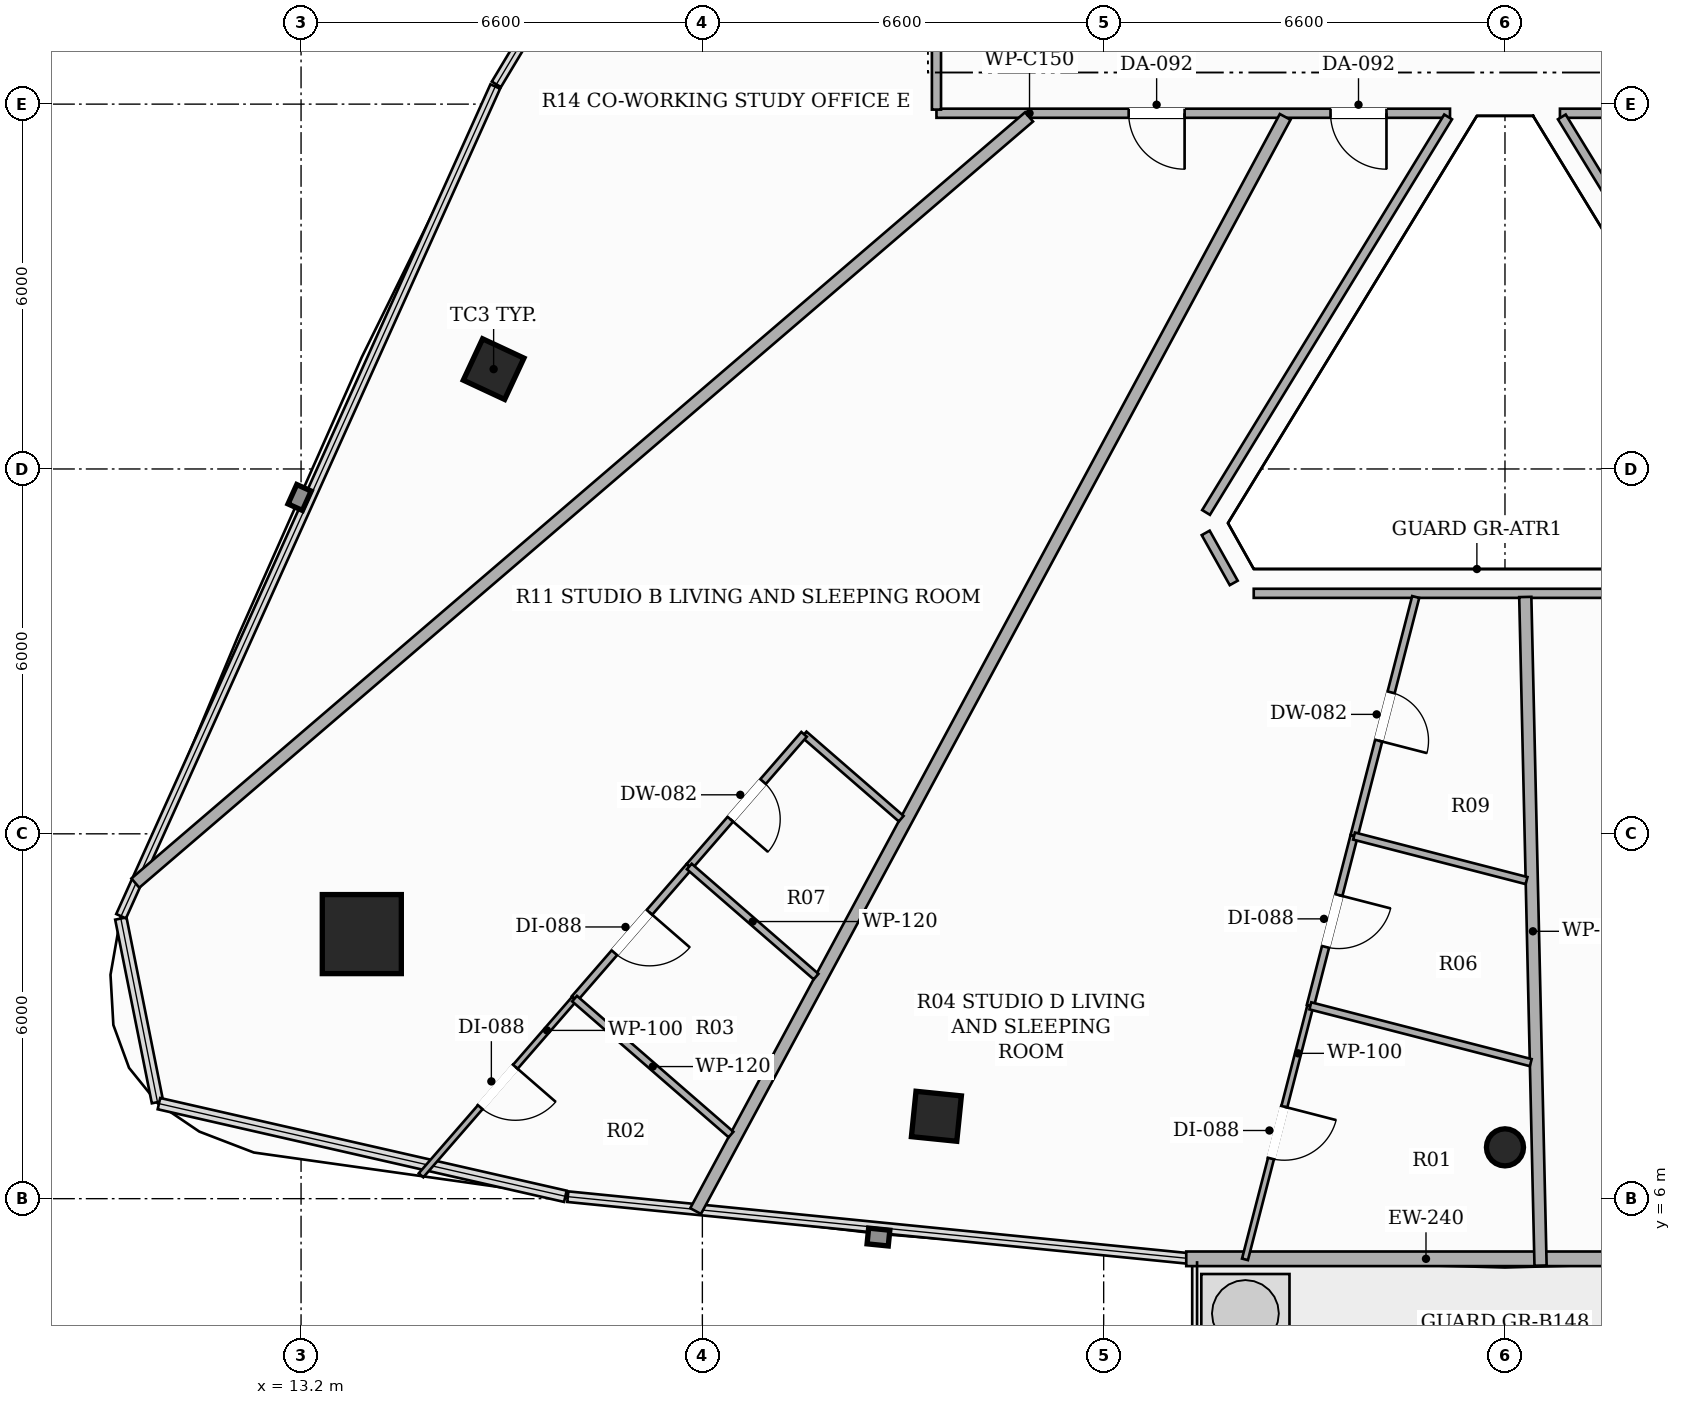
"""IFC4 building model, lengths in metres.
Left out: names, types, materials, properties, quantities, classifications, styles, units other than length and angle.
Written with IfcOpenShell. Run it as: python <this file> out.ifc"""

import sys

from ifc_helpers import new_model, si_unit, direction, frame, frame_2d, origin, origin_2d, place, context, subcontext, project, spatial, rectangle, hollow_rectangle, hollow_circle, extrude, element, fill, save


model = new_model("IFC4")
c1 = context("Model", 3, precision=1e-05, world=origin(), true_north=direction((0.0, 1.0)))
c2 = subcontext(c1, "Body", "Model", "MODEL_VIEW")
j1 = project(units=[si_unit("LENGTHUNIT", "METRE"), si_unit("PLANEANGLEUNIT", "RADIAN")], contexts=[c1])
p1 = place(None, origin())
s1 = spatial("IfcSite", under=j1, at=p1, CompositionType="ELEMENT")
p2 = place(p1, origin())
s2 = spatial("IfcBuilding", under=s1, at=p2, CompositionType="ELEMENT")
p3 = place(p2, frame((0.0, 0.0, 229.4)))
s3 = spatial("IfcBuildingStorey", under=s2, at=p3, CompositionType="ELEMENT", Elevation=229.4)
p4 = place(p3, frame((14.199, 10.351, 0.0), z_axis=(0.0, 0.0, 1.0), x_axis=(1.0, 0.0, 0.0)))
e1 = element("IfcColumn", 1, at=p4, inside=s3, PredefinedType="COLUMN", context=c2, shape_type="SweptSolid", body=[
    extrude(hollow_rectangle(XDim=1.3, YDim=1.3, WallThickness=0.04, at=origin_2d()), origin(), (0.0, 0.0, 1.0), 3.3),
])
for number, where, z_axis, x_axis in (
    (2, (16.367, 19.642, 0.0), (0.0, 0.0, 1.0), (0.423, 0.906, 0.0)),
    (3, (23.649, 7.355, 0.0), (0.0, 0.0, 1.0), (-0.995, 0.101, 0.0)),
):
    element("IfcColumn", number, at=place(p3, frame(where, z_axis=z_axis, x_axis=x_axis)), inside=s3, PredefinedType="COLUMN", context=c2, shape_type="SweptSolid", body=[
        extrude(hollow_rectangle(XDim=0.75, YDim=0.75, WallThickness=0.025, at=origin_2d()), origin(), (0.0, 0.0, 1.0), 3.3),
    ])
p5 = place(p3, frame((33.0, 6.844, 0.0), z_axis=(0.0, 0.0, 1.0), x_axis=(1.0, 0.0, 0.0)))
e4 = element("IfcColumn", 4, at=p5, inside=s3, PredefinedType="COLUMN", context=c2, shape_type="SweptSolid", body=[
    extrude(hollow_circle(Radius=0.305, WallThickness=0.016, at=origin_2d()), origin(), (0.0, 0.0, 1.0), 3.3),
])
p6 = place(p3, frame((27.758, 5.011, 0.0), z_axis=(0.0, 0.0, 1.0), x_axis=(1.0, 0.0, 0.0)))
e5 = element("IfcWall", 5, at=p6, inside=s3, PredefinedType="SOLIDWALL", context=c2, shape_type="SweptSolid", body=[
    extrude(rectangle(XDim=10.484, YDim=0.24, at=frame_2d((5.242, 0.0))), origin(), (0.0, 0.0, 1.0), 2.624),
])
p7 = place(p6, frame((7.986, 0.0, 0.0)))
e6 = element("IfcOpeningElement", 6, at=p7, cuts=e5, PredefinedType="OPENING", context=c2, shape_type="SweptSolid", body=[
    extrude(rectangle(XDim=1.8, YDim=2.2, at=frame_2d((0.9, 1.1))), frame((0.0, 0.13, 0.0), z_axis=(0.0, -1.0, 0.0), x_axis=(1.0, 0.0, 0.0)), (0.0, 0.0, 1.0), 0.26),
])
p8 = place(p3, frame((32.096, 23.85, 0.0), z_axis=(0.0, 0.0, 1.0), x_axis=(-1.0, 0.0, 0.0)))
e7 = element("IfcWall", 7, at=p8, inside=s3, PredefinedType="PARTITIONING", context=c2, shape_type="SweptSolid", body=[
    extrude(rectangle(XDim=8.446, YDim=0.15, at=frame_2d((4.223, 0.0))), origin(), (0.0, 0.0, 1.0), 2.565),
])
p9 = place(p8, frame((4.365, 0.0, 0.0)))
e8 = element("IfcOpeningElement", 8, at=p9, cuts=e7, PredefinedType="OPENING", context=c2, shape_type="SweptSolid", body=[
    extrude(rectangle(XDim=0.92, YDim=2.15, at=frame_2d((0.46, 1.075))), frame((0.0, 0.085, 0.0), z_axis=(0.0, -1.0, 0.0), x_axis=(1.0, 0.0, 0.0)), (0.0, 0.0, 1.0), 0.17),
])
p10 = place(p8, frame((1.045, 0.0, 0.0)))
e9 = element("IfcOpeningElement", 9, at=p10, cuts=e7, PredefinedType="OPENING", context=c2, shape_type="SweptSolid", body=[
    extrude(rectangle(XDim=0.92, YDim=2.15, at=frame_2d((0.46, 1.075))), frame((0.0, 0.085, 0.0), z_axis=(0.0, -1.0, 0.0), x_axis=(1.0, 0.0, 0.0)), (0.0, 0.0, 1.0), 0.17),
])
p11 = place(p3, frame((23.65, 23.91, 0.0), z_axis=(0.0, 0.0, 1.0), x_axis=(0.0, 1.0, 0.0)))
e10 = element("IfcWall", 10, at=p11, inside=s3, PredefinedType="PARTITIONING", context=c2, shape_type="SweptSolid", body=[
    extrude(rectangle(XDim=11.888, YDim=0.15, at=frame_2d((5.944, 0.0))), origin(), (0.0, 0.0, 1.0), 2.492),
])
p12 = place(p11, frame((5.504, 0.0, 0.0)))
e11 = element("IfcOpeningElement", 11, at=p12, cuts=e10, PredefinedType="OPENING", context=c2, shape_type="SweptSolid", body=[
    extrude(rectangle(XDim=0.88, YDim=2.1, at=frame_2d((0.44, 1.05))), frame((0.0, 0.085, 0.0), z_axis=(0.0, -1.0, 0.0), x_axis=(1.0, 0.0, 0.0)), (0.0, 0.0, 1.0), 0.17),
])
p13 = place(p3, frame((42.19, 23.85, 0.0), z_axis=(0.0, 0.0, 1.0), x_axis=(-1.0, 0.0, 0.0)))
e12 = element("IfcWall", 12, at=p13, inside=s3, PredefinedType="PARTITIONING", context=c2, shape_type="SweptSolid", body=[
    extrude(rectangle(XDim=8.286, YDim=0.15, at=frame_2d((4.143, 0.0))), origin(), (0.0, 0.0, 1.0), 2.565),
])
p14 = place(p13, frame((5.824, 0.0, 0.0)))
e13 = element("IfcOpeningElement", 13, at=p14, cuts=e12, PredefinedType="OPENING", context=c2, shape_type="SweptSolid", body=[
    extrude(rectangle(XDim=0.88, YDim=2.1, at=frame_2d((0.44, 1.05))), frame((0.0, 0.085, 0.0), z_axis=(0.0, -1.0, 0.0), x_axis=(1.0, 0.0, 0.0)), (0.0, 0.0, 1.0), 0.17),
])
p15 = place(p13, frame((2.745, 0.0, 0.0)))
e14 = element("IfcOpeningElement", 14, at=p15, cuts=e12, PredefinedType="OPENING", context=c2, shape_type="SweptSolid", body=[
    extrude(rectangle(XDim=0.88, YDim=2.1, at=frame_2d((0.44, 1.05))), frame((0.0, 0.085, 0.0), z_axis=(0.0, -1.0, 0.0), x_axis=(1.0, 0.0, 0.0)), (0.0, 0.0, 1.0), 0.17),
])
p16 = place(p3, frame((33.935, 23.79, 0.0), z_axis=(0.0, 0.0, 1.0), x_axis=(0.521984684225, -0.852954857794, 0.0)))
e15 = element("IfcWall", 15, at=p16, inside=s3, PredefinedType="PARTITIONING", context=c2, shape_type="SweptSolid", body=[
    extrude(rectangle(XDim=7.626, YDim=0.15, at=frame_2d((3.813, 0.0))), origin(), (0.0, 0.0, 1.0), 2.773),
])
p17 = place(p3, frame((37.132, 15.955, 0.0), z_axis=(0.0, 0.0, 1.0), x_axis=(-1.0, 0.0, 0.0)))
e16 = element("IfcWall", 16, at=p17, inside=s3, PredefinedType="PARTITIONING", context=c2, shape_type="SweptSolid", body=[
    extrude(rectangle(XDim=8.264, YDim=0.15, at=frame_2d((4.132, 0.0))), origin(), (0.0, 0.0, 1.0), 2.773),
])
p18 = place(p3, frame((28.539, 16.126, 0.0), z_axis=(0.0, 0.0, 1.0), x_axis=(-0.488847636641, 0.87236918111, 0.0)))
e17 = element("IfcWall", 17, at=p18, inside=s3, PredefinedType="PARTITIONING", context=c2, shape_type="SweptSolid", body=[
    extrude(rectangle(XDim=0.943, YDim=0.15, at=frame_2d((0.472, 0.0))), origin(), (0.0, 0.0, 1.0), 3.06),
])
p19 = place(p3, frame((28.084, 17.285, 0.0), z_axis=(0.0, 0.0, 1.0), x_axis=(0.521984684225, 0.852954857794, 0.0)))
e18 = element("IfcWall", 18, at=p19, inside=s3, PredefinedType="PARTITIONING", context=c2, shape_type="SweptSolid", body=[
    extrude(rectangle(XDim=7.626, YDim=0.15, at=frame_2d((3.813, 0.0))), origin(), (0.0, 0.0, 1.0), 2.773),
])
p20 = place(p3, frame((33.585, 4.899, 0.0), z_axis=(0.0, 0.0, 1.0), x_axis=(-0.022818213595, 0.999739630668, 0.0)))
e19 = element("IfcWall", 19, at=p20, inside=s3, PredefinedType="PARTITIONING", context=c2, shape_type="SweptSolid", body=[
    extrude(rectangle(XDim=10.999, YDim=0.2, at=frame_2d((5.5, 0.0))), origin(), (0.0, 0.0, 1.0), 2.492),
])
p21 = place(p3, frame((29.385, 23.79, 0.0), z_axis=(0.0, 0.0, 1.0), x_axis=(-0.474361203305, -0.880330306646, 0.0)))
e20 = element("IfcWall", 20, at=p21, inside=s3, PredefinedType="PARTITIONING", context=c2, shape_type="SweptSolid", body=[
    extrude(rectangle(XDim=20.44, YDim=0.2, at=frame_2d((10.22, 0.0))), origin(), (0.0, 0.0, 1.0), 2.492),
])
p22 = place(p3, frame((10.475, 11.19, 0.0), z_axis=(0.0, 0.0, 1.0), x_axis=(0.759210311249, 0.650845375871, 0.0)))
e21 = element("IfcWall", 21, at=p22, inside=s3, PredefinedType="PARTITIONING", context=c2, shape_type="SweptSolid", body=[
    extrude(rectangle(XDim=19.36, YDim=0.2, at=frame_2d((9.68, 0.0))), origin(), (0.0, 0.0, 1.0), 2.492),
])
p23 = place(p3, frame((23.07, 12.249, 0.0), z_axis=(0.0, 0.0, 1.0), x_axis=(-0.75504514731, 0.655672803709, 0.0)))
e22 = element("IfcWall", 22, at=p23, inside=s3, PredefinedType="PARTITIONING", context=c2, shape_type="SweptSolid", body=[
    extrude(rectangle(XDim=2.115, YDim=0.12, at=frame_2d((1.058, 0.0))), origin(), (0.0, 0.0, 1.0), 2.773),
])
p24 = place(p3, frame((21.473, 13.636, 0.0), z_axis=(0.0, 0.0, 1.0), x_axis=(-0.655840593364, -0.754899407932, 0.0)))
e23 = element("IfcWall", 23, at=p24, inside=s3, PredefinedType="PARTITIONING", context=c2, shape_type="SweptSolid", body=[
    extrude(rectangle(XDim=2.879, YDim=0.12, at=frame_2d((1.439, 0.0))), origin(), (0.0, 0.0, 1.0), 2.773),
])
p25 = place(p24, frame((1.029, 0.0, 0.0)))
e24 = element("IfcOpeningElement", 24, at=p25, cuts=e23, PredefinedType="OPENING", context=c2, shape_type="SweptSolid", body=[
    extrude(rectangle(XDim=0.82, YDim=2.1, at=frame_2d((0.41, 1.05))), frame((0.0, 0.07, 0.0), z_axis=(0.0, -1.0, 0.0), x_axis=(1.0, 0.0, 0.0)), (0.0, 0.0, 1.0), 0.14),
])
p26 = place(p3, frame((19.585, 11.463, 0.0), z_axis=(0.0, 0.0, 1.0), x_axis=(-0.655689200825, -0.755030907924, 0.0)))
e25 = element("IfcWall", 25, at=p26, inside=s3, PredefinedType="PARTITIONING", context=c2, shape_type="SweptSolid", body=[
    extrude(rectangle(XDim=2.878, YDim=0.12, at=frame_2d((1.439, 0.0))), origin(), (0.0, 0.0, 1.0), 2.492),
])
p27 = place(p26, frame((0.999, 0.0, 0.0)))
e26 = element("IfcOpeningElement", 26, at=p27, cuts=e25, PredefinedType="OPENING", context=c2, shape_type="SweptSolid", body=[
    extrude(rectangle(XDim=0.88, YDim=2.1, at=frame_2d((0.44, 1.05))), frame((0.0, 0.07, 0.0), z_axis=(0.0, -1.0, 0.0), x_axis=(1.0, 0.0, 0.0)), (0.0, 0.0, 1.0), 0.14),
])
p28 = place(p3, frame((17.698, 9.29, 0.0), z_axis=(0.0, 0.0, 1.0), x_axis=(-0.655874061554, -0.754870330176, 0.0)))
e27 = element("IfcWall", 27, at=p28, inside=s3, PredefinedType="PARTITIONING", context=c2, shape_type="SweptSolid", body=[
    extrude(rectangle(XDim=3.85, YDim=0.1, at=frame_2d((1.925, 0.0))), origin(), (0.0, 0.0, 1.0), 2.492),
])
p29 = place(p28, frame((1.485, 0.0, 0.0)))
e28 = element("IfcOpeningElement", 28, at=p29, cuts=e27, PredefinedType="OPENING", context=c2, shape_type="SweptSolid", body=[
    extrude(rectangle(XDim=0.88, YDim=2.1, at=frame_2d((0.44, 1.05))), frame((0.0, 0.06, 0.0), z_axis=(0.0, -1.0, 0.0), x_axis=(1.0, 0.0, 0.0)), (0.0, 0.0, 1.0), 0.12),
])
p30 = place(p3, frame((21.67, 9.652, 0.0), z_axis=(0.0, 0.0, 1.0), x_axis=(-0.755003171317, 0.655721138367, 0.0)))
e29 = element("IfcWall", 29, at=p30, inside=s3, PredefinedType="PARTITIONING", context=c2, shape_type="SweptSolid", body=[
    extrude(rectangle(XDim=2.761, YDim=0.12, at=frame_2d((1.381, 0.0))), origin(), (0.0, 0.0, 1.0), 2.773),
])
p31 = place(p3, frame((20.271, 7.055, 0.0), z_axis=(0.0, 0.0, 1.0), x_axis=(-0.754936987289, 0.65579733548, 0.0)))
e30 = element("IfcWall", 30, at=p31, inside=s3, PredefinedType="PARTITIONING", context=c2, shape_type="SweptSolid", body=[
    extrude(rectangle(XDim=3.408, YDim=0.12, at=frame_2d((1.704, 0.0))), origin(), (0.0, 0.0, 1.0), 2.492),
])
p32 = place(p3, frame((31.532, 15.895, 0.0), z_axis=(0.0, 0.0, 1.0), x_axis=(-0.24968708983, -0.968326575682, 0.0)))
e31 = element("IfcWall", 31, at=p32, inside=s3, PredefinedType="PARTITIONING", context=c2, shape_type="SweptSolid", body=[
    extrude(rectangle(XDim=4.061, YDim=0.12, at=frame_2d((2.03, 0.0))), origin(), (0.0, 0.0, 1.0), 3.06),
])
p33 = place(p32, frame((1.62, 0.0, 0.0)))
e32 = element("IfcOpeningElement", 32, at=p33, cuts=e31, PredefinedType="OPENING", context=c2, shape_type="SweptSolid", body=[
    extrude(rectangle(XDim=0.82, YDim=2.1, at=frame_2d((0.41, 1.05))), frame((0.0, 0.07, 0.0), z_axis=(0.0, -1.0, 0.0), x_axis=(1.0, 0.0, 0.0)), (0.0, 0.0, 1.0), 0.14),
])
p34 = place(p3, frame((30.518, 11.963, 0.0), z_axis=(0.0, 0.0, 1.0), x_axis=(-0.249383700926, -0.968404755106, 0.0)))
e33 = element("IfcWall", 33, at=p34, inside=s3, PredefinedType="PARTITIONING", context=c2, shape_type="SweptSolid", body=[
    extrude(rectangle(XDim=2.883, YDim=0.12, at=frame_2d((1.441, 0.0))), origin(), (0.0, 0.0, 1.0), 3.06),
])
p35 = place(p34, frame((1.002, 0.0, 0.0)))
e34 = element("IfcOpeningElement", 34, at=p35, cuts=e33, PredefinedType="OPENING", context=c2, shape_type="SweptSolid", body=[
    extrude(rectangle(XDim=0.88, YDim=2.1, at=frame_2d((0.44, 1.05))), frame((0.0, 0.07, 0.0), z_axis=(0.0, -1.0, 0.0), x_axis=(1.0, 0.0, 0.0)), (0.0, 0.0, 1.0), 0.14),
])
p36 = place(p3, frame((29.799, 9.171, 0.0), z_axis=(0.0, 0.0, 1.0), x_axis=(-0.249680784234, -0.968328201585, 0.0)))
e35 = element("IfcWall", 35, at=p36, inside=s3, PredefinedType="PARTITIONING", context=c2, shape_type="SweptSolid", body=[
    extrude(rectangle(XDim=4.305, YDim=0.1, at=frame_2d((2.153, 0.0))), origin(), (0.0, 0.0, 1.0), 2.492),
])
p37 = place(p36, frame((1.713, 0.0, 0.0)))
e36 = element("IfcOpeningElement", 36, at=p37, cuts=e35, PredefinedType="OPENING", context=c2, shape_type="SweptSolid", body=[
    extrude(rectangle(XDim=0.88, YDim=2.1, at=frame_2d((0.44, 1.05))), frame((0.0, 0.06, 0.0), z_axis=(0.0, -1.0, 0.0), x_axis=(1.0, 0.0, 0.0)), (0.0, 0.0, 1.0), 0.12),
])
p38 = place(p3, frame((33.355, 11.231, 0.0), z_axis=(0.0, 0.0, 1.0), x_axis=(-0.968291630449, 0.249822573846, 0.0)))
e37 = element("IfcWall", 37, at=p38, inside=s3, PredefinedType="PARTITIONING", context=c2, shape_type="SweptSolid", body=[
    extrude(rectangle(XDim=2.93, YDim=0.12, at=frame_2d((1.465, 0.0))), origin(), (0.0, 0.0, 1.0), 2.773),
])
p39 = place(p3, frame((33.424, 8.237, 0.0), z_axis=(0.0, 0.0, 1.0), x_axis=(-0.968383623763, 0.249465743595, 0.0)))
e38 = element("IfcWall", 38, at=p39, inside=s3, PredefinedType="PARTITIONING", context=c2, shape_type="SweptSolid", body=[
    extrude(rectangle(XDim=3.743, YDim=0.12, at=frame_2d((1.872, 0.0))), origin(), (0.0, 0.0, 1.0), 2.773),
])
p40 = place(p9, origin())
e39 = element("IfcDoor", 39, at=p40, inside=s3, OperationType="SINGLE_SWING_LEFT", PredefinedType="DOOR", context=c2, shape_type="SweptSolid", body=[
    extrude(rectangle(XDim=0.92, YDim=2.15, at=frame_2d((0.46, 1.075))), frame((0.0, 0.025, 0.0), z_axis=(0.0, -1.0, 0.0), x_axis=(1.0, 0.0, 0.0)), (0.0, 0.0, 1.0), 0.05),
])
fill(e8, e39)
p41 = place(p25, origin())
e40 = element("IfcDoor", 40, at=p41, inside=s3, OperationType="SINGLE_SWING_RIGHT", PredefinedType="DOOR", context=c2, shape_type="SweptSolid", body=[
    extrude(rectangle(XDim=0.82, YDim=2.1, at=frame_2d((0.41, 1.05))), frame((0.0, 0.025, 0.0), z_axis=(0.0, -1.0, 0.0), x_axis=(1.0, 0.0, 0.0)), (0.0, 0.0, 1.0), 0.05),
])
fill(e24, e40)
p42 = place(p27, origin())
e41 = element("IfcDoor", 41, at=p42, inside=s3, OperationType="SINGLE_SWING_LEFT", PredefinedType="DOOR", context=c2, shape_type="SweptSolid", body=[
    extrude(rectangle(XDim=0.88, YDim=2.1, at=frame_2d((0.44, 1.05))), frame((0.0, 0.025, 0.0), z_axis=(0.0, -1.0, 0.0), x_axis=(1.0, 0.0, 0.0)), (0.0, 0.0, 1.0), 0.05),
])
fill(e26, e41)
p43 = place(p29, origin())
e42 = element("IfcDoor", 42, at=p43, inside=s3, OperationType="SINGLE_SWING_LEFT", PredefinedType="DOOR", context=c2, shape_type="SweptSolid", body=[
    extrude(rectangle(XDim=0.88, YDim=2.1, at=frame_2d((0.44, 1.05))), frame((0.0, 0.025, 0.0), z_axis=(0.0, -1.0, 0.0), x_axis=(1.0, 0.0, 0.0)), (0.0, 0.0, 1.0), 0.05),
])
fill(e28, e42)
p44 = place(p10, origin())
e43 = element("IfcDoor", 43, at=p44, inside=s3, OperationType="SINGLE_SWING_LEFT", PredefinedType="DOOR", context=c2, shape_type="SweptSolid", body=[
    extrude(rectangle(XDim=0.92, YDim=2.15, at=frame_2d((0.46, 1.075))), frame((0.0, 0.025, 0.0), z_axis=(0.0, -1.0, 0.0), x_axis=(1.0, 0.0, 0.0)), (0.0, 0.0, 1.0), 0.05),
])
fill(e9, e43)
p45 = place(p33, origin())
e44 = element("IfcDoor", 44, at=p45, inside=s3, OperationType="SINGLE_SWING_RIGHT", PredefinedType="DOOR", context=c2, shape_type="SweptSolid", body=[
    extrude(rectangle(XDim=0.82, YDim=2.1, at=frame_2d((0.41, 1.05))), frame((0.0, 0.025, 0.0), z_axis=(0.0, -1.0, 0.0), x_axis=(1.0, 0.0, 0.0)), (0.0, 0.0, 1.0), 0.05),
])
fill(e32, e44)
p46 = place(p35, origin())
e45 = element("IfcDoor", 45, at=p46, inside=s3, OperationType="SINGLE_SWING_LEFT", PredefinedType="DOOR", context=c2, shape_type="SweptSolid", body=[
    extrude(rectangle(XDim=0.88, YDim=2.1, at=frame_2d((0.44, 1.05))), frame((0.0, 0.025, 0.0), z_axis=(0.0, -1.0, 0.0), x_axis=(1.0, 0.0, 0.0)), (0.0, 0.0, 1.0), 0.05),
])
fill(e34, e45)
p47 = place(p37, origin())
e46 = element("IfcDoor", 46, at=p47, inside=s3, OperationType="SINGLE_SWING_LEFT", PredefinedType="DOOR", context=c2, shape_type="SweptSolid", body=[
    extrude(rectangle(XDim=0.88, YDim=2.1, at=frame_2d((0.44, 1.05))), frame((0.0, 0.025, 0.0), z_axis=(0.0, -1.0, 0.0), x_axis=(1.0, 0.0, 0.0)), (0.0, 0.0, 1.0), 0.05),
])
fill(e36, e46)
save(model, sys.argv[1])
